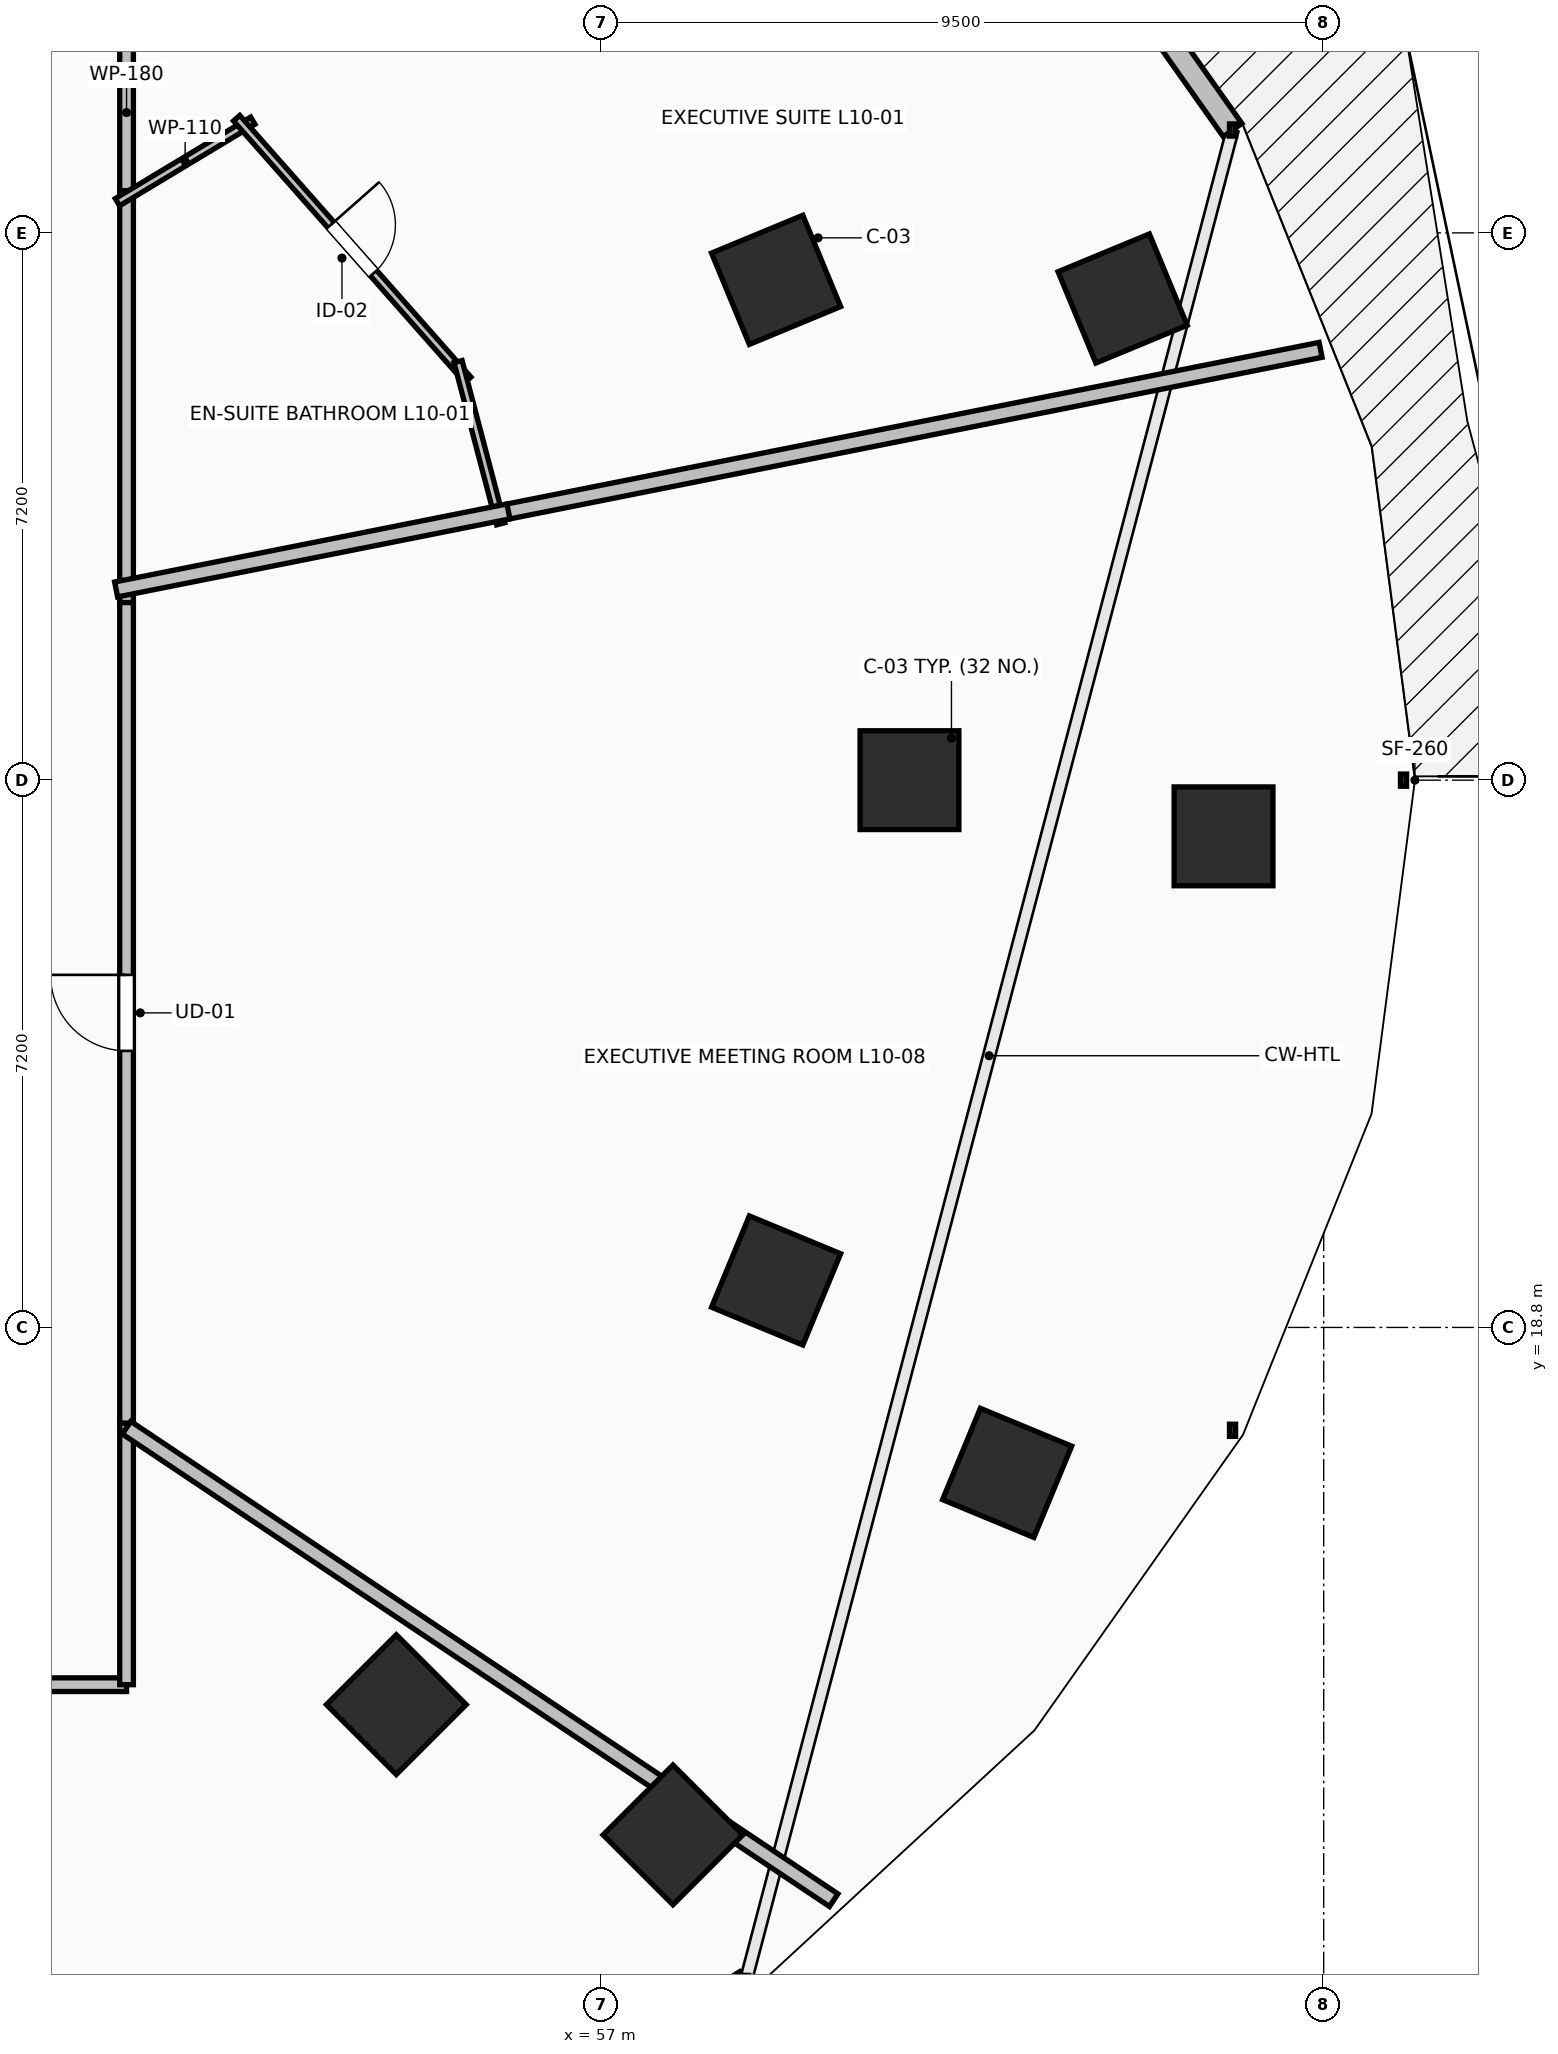
"""IFC4 building model, lengths in metres.
Left out: names, types, materials, properties, quantities, classifications, styles, units other than length and angle.
Written with IfcOpenShell. Run it as: python <this file> out.ifc"""

import sys

from ifc_helpers import new_model, si_unit, direction, frame, frame_2d, origin, origin_2d, place, context, subcontext, project, spatial, rectangle, extrude, element, fill, save


model = new_model("IFC4")
c1 = context("Model", 3, precision=1e-05, world=origin(), true_north=direction((0.0, 1.0)))
c2 = subcontext(c1, "Body", "Model", "MODEL_VIEW")
j1 = project(units=[si_unit("LENGTHUNIT", "METRE"), si_unit("PLANEANGLEUNIT", "RADIAN")], contexts=[c1])
p1 = place(None, origin())
s1 = spatial("IfcSite", under=j1, at=p1, CompositionType="ELEMENT")
p2 = place(p1, origin())
s2 = spatial("IfcBuilding", under=s1, at=p2, CompositionType="ELEMENT")
p3 = place(p2, frame((0.0, 0.0, 41.5)))
s3 = spatial("IfcBuildingStorey", under=s2, at=p3, CompositionType="ELEMENT", Elevation=41.5)
for number, where, z_axis, x_axis in (
    (1, (61.05, 26.0, 0.0), (0.0, 0.0, 1.0), (1.0, 0.0, 0.0)),
    (2, (59.295, 32.582, 0.0), (0.0, 0.0, 1.0), (0.924, 0.383, 0.0)),
    (3, (54.299, 13.838, 0.0), (0.0, 0.0, 1.0), (0.707, -0.707, 0.0)),
    (4, (59.295, 19.418, 0.0), (0.0, 0.0, 1.0), (0.924, -0.383, 0.0)),
    (5, (65.182, 25.261, 0.0), (0.0, 0.0, 1.0), (1.0, 0.0, 0.0)),
    (6, (63.854, 32.337, 0.0), (0.0, 0.0, 1.0), (0.924, 0.383, 0.0)),
    (7, (57.939, 12.124, 0.0), (0.0, 0.0, 1.0), (0.707, -0.707, 0.0)),
    (8, (62.335, 16.886, 0.0), (0.0, 0.0, 1.0), (0.924, -0.383, 0.0)),
):
    element("IfcColumn", number, at=place(p3, frame(where, z_axis=z_axis, x_axis=x_axis)), inside=s3, PredefinedType="COLUMN", context=c2, shape_type="SweptSolid", body=[
        extrude(rectangle(XDim=1.3, YDim=1.3, at=origin_2d()), origin(), (0.0, 0.0, 1.0), 3.5),
    ])
p4 = place(p3, frame((65.301, 34.553, 0.0), z_axis=(0.0, 0.0, 1.0), x_axis=(-0.577130815624, 0.816651713803, 0.0)))
e9 = element("IfcWall", 9, at=p4, inside=s3, PredefinedType="STANDARD", context=c2, shape_type="SweptSolid", body=[
    extrude(rectangle(XDim=4.731, YDim=0.3, at=frame_2d((2.366, 0.0))), origin(), (0.0, 0.0, 1.0), 3.24),
])
p5 = place(p4, frame((1.566, 0.0, 0.0)))
e10 = element("IfcOpeningElement", 10, at=p5, cuts=e9, PredefinedType="OPENING", context=c2, shape_type="SweptSolid", body=[
    extrude(rectangle(XDim=1.6, YDim=2.3, at=frame_2d((0.8, 1.15))), frame((0.0, 0.165, 0.0), z_axis=(0.0, -1.0, 0.0), x_axis=(1.0, 0.0, 0.0)), (0.0, 0.0, 1.0), 0.33),
])
p6 = place(p3, frame((54.417, 7.417, 0.0), z_axis=(0.0, 0.0, 1.0), x_axis=(0.849633724826, 0.527373239404, 0.0)))
e11 = element("IfcWall", 11, at=p6, inside=s3, PredefinedType="STANDARD", context=c2, shape_type="SweptSolid", body=[
    extrude(rectangle(XDim=5.271, YDim=0.3, at=frame_2d((2.635, 0.0))), origin(), (0.0, 0.0, 1.0), 3.24),
])
p7 = place(p6, frame((1.885, 0.0, 0.85)))
e12 = element("IfcOpeningElement", 12, at=p7, cuts=e11, PredefinedType="OPENING", context=c2, shape_type="SweptSolid", body=[
    extrude(rectangle(XDim=1.5, YDim=2.19, at=frame_2d((0.75, 1.095))), frame((0.0, 0.165, 0.0), z_axis=(0.0, -1.0, 0.0), x_axis=(1.0, 0.0, 0.0)), (0.0, 0.0, 1.0), 0.33),
])
p8 = place(p3, frame((50.75, 33.616, 0.0), z_axis=(0.0, 0.0, 1.0), x_axis=(0.0, 1.0, 0.0)))
e13 = element("IfcWall", 13, at=p8, inside=s3, PredefinedType="PARTITIONING", context=c2, shape_type="SweptSolid", body=[
    extrude(rectangle(XDim=2.334, YDim=0.18, at=frame_2d((1.167, 0.0))), origin(), (0.0, 0.0, 1.0), 2.432),
])
p9 = place(p3, frame((50.75, 28.336, 0.0), z_axis=(0.0, 0.0, 1.0), x_axis=(0.0, 1.0, 0.0)))
e14 = element("IfcWall", 14, at=p9, inside=s3, PredefinedType="PARTITIONING", context=c2, shape_type="SweptSolid", body=[
    extrude(rectangle(XDim=5.42, YDim=0.18, at=frame_2d((2.71, 0.0))), origin(), (0.0, 0.0, 1.0), 2.432),
])
p10 = place(p3, frame((42.34, 14.1, 0.0), z_axis=(0.0, 0.0, 1.0), x_axis=(1.0, 0.0, 0.0)))
e15 = element("IfcWall", 15, at=p10, inside=s3, PredefinedType="PARTITIONING", context=c2, shape_type="SweptSolid", body=[
    extrude(rectangle(XDim=8.41, YDim=0.18, at=frame_2d((4.205, 0.0))), origin(), (0.0, 0.0, 1.0), 2.432),
])
p11 = place(p10, frame((3.705, 0.0, 0.0)))
e16 = element("IfcOpeningElement", 16, at=p11, cuts=e15, PredefinedType="OPENING", context=c2, shape_type="SweptSolid", body=[
    extrude(rectangle(XDim=1.0, YDim=2.15, at=frame_2d((0.5, 1.075))), frame((0.0, 0.105, 0.0), z_axis=(0.0, -1.0, 0.0), x_axis=(1.0, 0.0, 0.0)), (0.0, 0.0, 1.0), 0.21),
])
p12 = place(p3, frame((50.75, 14.1, 0.0), z_axis=(0.0, 0.0, 1.0), x_axis=(0.0, 1.0, 0.0)))
e17 = element("IfcWall", 17, at=p12, inside=s3, PredefinedType="PARTITIONING", context=c2, shape_type="SweptSolid", body=[
    extrude(rectangle(XDim=3.441, YDim=0.18, at=frame_2d((1.72, 0.0))), origin(), (0.0, 0.0, 1.0), 2.432),
])
p13 = place(p3, frame((50.75, 17.541, 0.0), z_axis=(0.0, 0.0, 1.0), x_axis=(0.0, 1.0, 0.0)))
e18 = element("IfcWall", 18, at=p13, inside=s3, PredefinedType="PARTITIONING", context=c2, shape_type="SweptSolid", body=[
    extrude(rectangle(XDim=10.795, YDim=0.18, at=frame_2d((5.397, 0.0))), origin(), (0.0, 0.0, 1.0), 2.432),
])
p14 = place(p13, frame((4.897, 0.0, 0.0)))
e19 = element("IfcOpeningElement", 19, at=p14, cuts=e18, PredefinedType="OPENING", context=c2, shape_type="SweptSolid", body=[
    extrude(rectangle(XDim=1.0, YDim=2.15, at=frame_2d((0.5, 1.075))), frame((0.0, 0.105, 0.0), z_axis=(0.0, -1.0, 0.0), x_axis=(1.0, 0.0, 0.0)), (0.0, 0.0, 1.0), 0.21),
])
p15 = place(p3, frame((50.63, 33.604, 0.0), z_axis=(0.0, 0.0, 1.0), x_axis=(0.856631627837, 0.515928535932, 0.0)))
e20 = element("IfcWall", 20, at=p15, inside=s3, PredefinedType="PARTITIONING", context=c2, shape_type="SweptSolid", body=[
    extrude(rectangle(XDim=2.079, YDim=0.11, at=frame_2d((1.04, 0.0))), origin(), (0.0, 0.0, 1.0), 3.24),
])
p16 = place(p3, frame((52.198, 34.709, 0.0), z_axis=(0.0, 0.0, 1.0), x_axis=(0.662071486681, -0.74944068913, 0.0)))
e21 = element("IfcWall", 21, at=p16, inside=s3, PredefinedType="PARTITIONING", context=c2, shape_type="SweptSolid", body=[
    extrude(rectangle(XDim=4.594, YDim=0.11, at=frame_2d((2.297, 0.0))), origin(), (0.0, 0.0, 1.0), 2.432),
])
p17 = place(p16, frame((1.872, 0.0, 0.0)))
e22 = element("IfcOpeningElement", 22, at=p17, cuts=e21, PredefinedType="OPENING", context=c2, shape_type="SweptSolid", body=[
    extrude(rectangle(XDim=0.85, YDim=2.1, at=frame_2d((0.425, 1.05))), frame((0.0, 0.07, 0.0), z_axis=(0.0, -1.0, 0.0), x_axis=(1.0, 0.0, 0.0)), (0.0, 0.0, 1.0), 0.14),
])
p18 = place(p3, frame((55.111, 31.506, 0.0), z_axis=(0.0, 0.0, 1.0), x_axis=(0.254389812051, -0.967101764823, 0.0)))
e23 = element("IfcWall", 23, at=p18, inside=s3, PredefinedType="PARTITIONING", context=c2, shape_type="SweptSolid", body=[
    extrude(rectangle(XDim=2.206, YDim=0.11, at=frame_2d((1.103, 0.0))), origin(), (0.0, 0.0, 1.0), 3.24),
])
p19 = place(p3, frame((55.637, 29.508, 0.0), z_axis=(0.0, 0.0, 1.0), x_axis=(0.980781844691, 0.195107593712, 0.0)))
e24 = element("IfcWall", 24, at=p19, inside=s3, PredefinedType="PARTITIONING", context=c2, shape_type="SweptSolid", body=[
    extrude(rectangle(XDim=11.034, YDim=0.2, at=frame_2d((5.517, 0.0))), origin(), (0.0, 0.0, 1.0), 2.624),
])
p20 = place(p3, frame((50.613, 28.509, 0.0), z_axis=(0.0, 0.0, 1.0), x_axis=(0.980788877604, 0.195072236795, 0.0)))
e25 = element("IfcWall", 25, at=p20, inside=s3, PredefinedType="PARTITIONING", context=c2, shape_type="SweptSolid", body=[
    extrude(rectangle(XDim=5.263, YDim=0.2, at=frame_2d((2.631, 0.0))), origin(), (0.0, 0.0, 1.0), 2.972),
])
p21 = place(p3, frame((60.053, 11.265, 0.0), z_axis=(0.0, 0.0, 1.0), x_axis=(-0.831469078055, 0.555571032577, 0.0)))
e26 = element("IfcWall", 26, at=p21, inside=s3, PredefinedType="PARTITIONING", context=c2, shape_type="SweptSolid", body=[
    extrude(rectangle(XDim=11.189, YDim=0.2, at=frame_2d((5.594, 0.0))), origin(), (0.0, 0.0, 1.0), 2.624),
])
p22 = place(p14, origin())
e27 = element("IfcDoor", 27, at=p22, inside=s3, OperationType="SINGLE_SWING_RIGHT", PredefinedType="DOOR", context=c2, shape_type="SweptSolid", body=[
    extrude(rectangle(XDim=1.0, YDim=2.15, at=frame_2d((0.5, 1.075))), frame((0.0, 0.025, 0.0), z_axis=(0.0, -1.0, 0.0), x_axis=(1.0, 0.0, 0.0)), (0.0, 0.0, 1.0), 0.05),
])
fill(e19, e27)
p23 = place(p17, origin())
e28 = element("IfcDoor", 28, at=p23, inside=s3, OperationType="SINGLE_SWING_LEFT", PredefinedType="DOOR", context=c2, shape_type="SweptSolid", body=[
    extrude(rectangle(XDim=0.85, YDim=2.1, at=frame_2d((0.425, 1.05))), frame((0.0, 0.025, 0.0), z_axis=(0.0, -1.0, 0.0), x_axis=(1.0, 0.0, 0.0)), (0.0, 0.0, 1.0), 0.05),
])
fill(e22, e28)
save(model, sys.argv[1])
